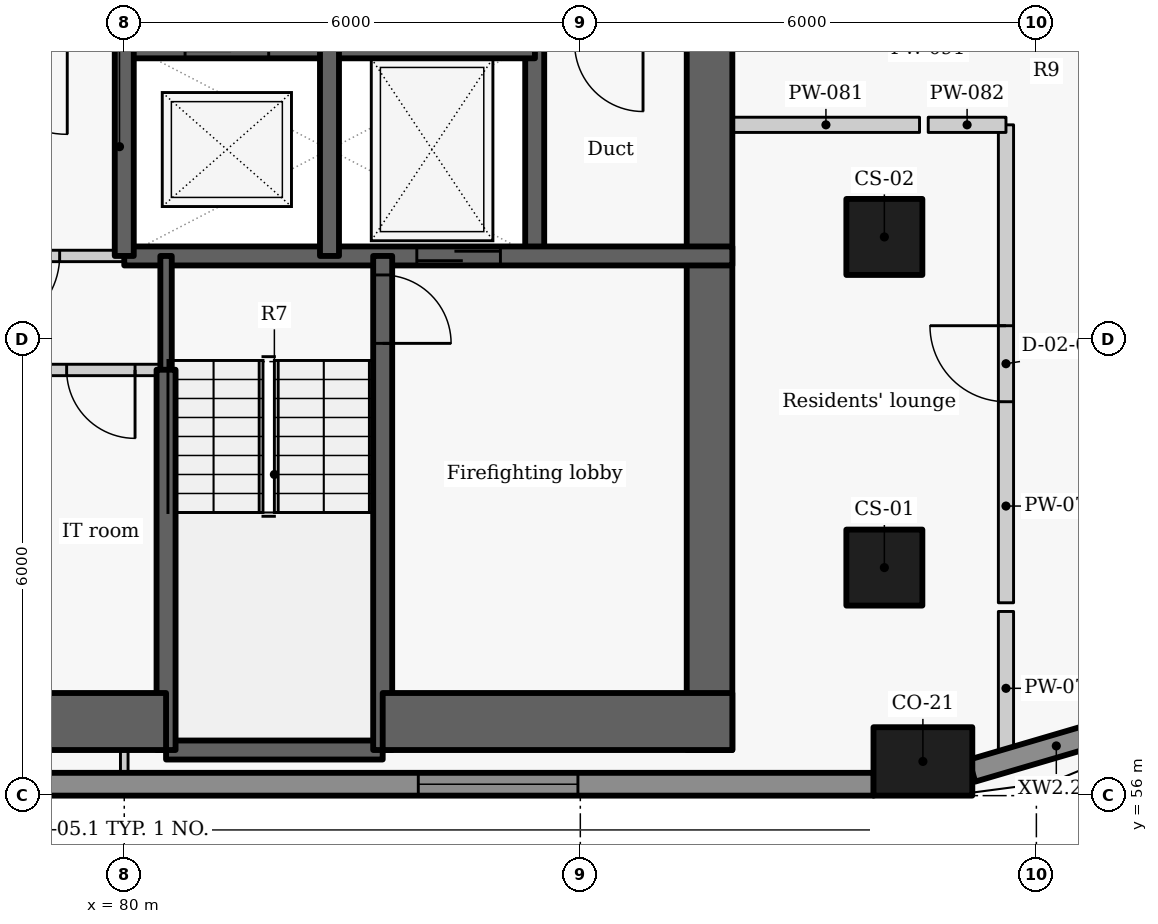
"""IFC4 building model, lengths in metres.
Left out: names, types, materials, properties, quantities, classifications, styles, units other than length and angle.
Written with IfcOpenShell. Run it as: python <this file> out.ifc"""

import sys

from ifc_helpers import new_model, si_unit, direction, frame, frame_2d, origin, origin_2d, place, context, subcontext, project, spatial, rectangle, extrude, element, fill, save


model = new_model("IFC4")
c1 = context("Model", 3, precision=1e-05, world=origin(), true_north=direction((0.0, 1.0)))
c2 = subcontext(c1, "Body", "Model", "MODEL_VIEW")
j1 = project(units=[si_unit("LENGTHUNIT", "METRE"), si_unit("PLANEANGLEUNIT", "RADIAN")], contexts=[c1])
p1 = place(None, origin())
s1 = spatial("IfcSite", under=j1, at=p1, CompositionType="ELEMENT")
p2 = place(p1, origin())
s2 = spatial("IfcBuilding", under=s1, at=p2, CompositionType="ELEMENT")
p3 = place(p2, frame((0.0, 0.0, 140.4)))
s3 = spatial("IfcBuildingStorey", under=s2, at=p3, CompositionType="ELEMENT", Elevation=140.4)
p4 = place(p3, frame((90.507, 56.45, 0.0), z_axis=(0.0, 0.0, 1.0), x_axis=(1.0, 0.0, 0.0)))
e1 = element("IfcColumn", 1, at=p4, inside=s3, PredefinedType="COLUMN", context=c2, shape_type="SweptSolid", body=[
    extrude(rectangle(XDim=1.3, YDim=0.9, at=origin_2d()), origin(), (0.0, 0.0, 1.0), 3.3),
])
for number, where, z_axis, x_axis in (
    (2, (90.0, 59.0, 0.0), (0.0, 0.0, 1.0), (0.0, 1.0, 0.0)),
    (3, (90.0, 63.35, 0.0), (0.0, 0.0, 1.0), (0.0, 1.0, 0.0)),
):
    element("IfcColumn", number, at=place(p3, frame(where, z_axis=z_axis, x_axis=x_axis)), inside=s3, PredefinedType="COLUMN", context=c2, shape_type="SweptSolid", body=[
        extrude(rectangle(XDim=1.0, YDim=1.0, at=origin_2d()), origin(), (0.0, 0.0, 1.0), 3.3),
    ])
p5 = place(p3, frame((69.821, 56.15, 0.0), z_axis=(0.0, 0.0, 1.0), x_axis=(1.0, 0.0, 0.0)))
e4 = element("IfcWall", 4, at=p5, inside=s3, PredefinedType="SOLIDWALL", context=c2, shape_type="SweptSolid", body=[
    extrude(rectangle(XDim=20.04, YDim=0.3, at=frame_2d((10.02, 0.0))), origin(), (0.0, 0.0, 1.0), 2.425),
])
p6 = place(p5, frame((4.051, 0.0, 0.9)))
e5 = element("IfcOpeningElement", 5, at=p6, cuts=e4, PredefinedType="OPENING", context=c2, shape_type="SweptSolid", body=[
    extrude(rectangle(XDim=2.1, YDim=1.1, at=frame_2d((1.05, 0.55))), frame((0.0, 0.16, 0.0), z_axis=(0.0, -1.0, 0.0), x_axis=(1.0, 0.0, 0.0)), (0.0, 0.0, 1.0), 0.32),
])
p7 = place(p5, frame((14.047, 0.0, 0.9)))
e6 = element("IfcOpeningElement", 6, at=p7, cuts=e4, PredefinedType="OPENING", context=c2, shape_type="SweptSolid", body=[
    extrude(rectangle(XDim=2.1, YDim=1.1, at=frame_2d((1.05, 0.55))), frame((0.0, 0.16, 0.0), z_axis=(0.0, -1.0, 0.0), x_axis=(1.0, 0.0, 0.0)), (0.0, 0.0, 1.0), 0.32),
])
p8 = place(p3, frame((91.153, 56.328, 0.0), z_axis=(0.0, 0.0, 1.0), x_axis=(0.959473072336, 0.281800325517, 0.0)))
e7 = element("IfcWall", 7, at=p8, inside=s3, PredefinedType="SOLIDWALL", context=c2, shape_type="SweptSolid", body=[
    extrude(rectangle(XDim=2.312, YDim=0.3, at=frame_2d((1.156, 0.0))), origin(), (0.0, 0.0, 1.0), 2.425),
])
p9 = place(p3, frame((85.4, 63.1, -0.275), z_axis=(0.0, 0.0, 1.0), x_axis=(0.0, 1.0, 0.0)))
e8 = element("IfcWall", 8, at=p9, inside=s3, PredefinedType="SHEAR", context=c2, shape_type="SweptSolid", body=[
    extrude(rectangle(XDim=2.8, YDim=0.25, at=frame_2d((1.4, 0.0))), origin(), (0.0, 0.0, 1.0), 3.3),
])
p10 = place(p3, frame((87.7, 72.2, -0.275), z_axis=(0.0, 0.0, 1.0), x_axis=(0.0, -1.0, 0.0)))
e9 = element("IfcWall", 9, at=p10, inside=s3, PredefinedType="SHEAR", context=c2, shape_type="SweptSolid", body=[
    extrude(rectangle(XDim=15.6, YDim=0.6, at=frame_2d((7.8, 0.0))), origin(), (0.0, 0.0, 1.0), 3.3),
])
p11 = place(p10, frame((3.852, 0.0, 0.275)))
e10 = element("IfcOpeningElement", 10, at=p11, cuts=e9, PredefinedType="OPENING", context=c2, shape_type="SweptSolid", body=[
    extrude(rectangle(XDim=1.5, YDim=2.1, at=frame_2d((0.75, 1.05))), frame((0.0, 0.31, 0.0), z_axis=(0.0, -1.0, 0.0), x_axis=(1.0, 0.0, 0.0)), (0.0, 0.0, 1.0), 0.62),
])
p12 = place(p3, frame((79.997, 65.9, -0.275), z_axis=(0.0, 0.0, 1.0), x_axis=(1.0, 0.0, 0.0)))
e11 = element("IfcWall", 11, at=p12, inside=s3, PredefinedType="SHEAR", context=c2, shape_type="SweptSolid", body=[
    extrude(rectangle(XDim=5.406, YDim=0.4, at=frame_2d((2.703, 0.0))), origin(), (0.0, 0.0, 1.0), 3.3),
])
p13 = place(p12, frame((0.803, 0.0, 0.275)))
e12 = element("IfcOpeningElement", 12, at=p13, cuts=e11, PredefinedType="OPENING", context=c2, shape_type="SweptSolid", body=[
    extrude(rectangle(XDim=1.1, YDim=2.1, at=frame_2d((0.55, 1.05))), frame((0.0, 0.21, 0.0), z_axis=(0.0, -1.0, 0.0), x_axis=(1.0, 0.0, 0.0)), (0.0, 0.0, 1.0), 0.42),
])
p14 = place(p3, frame((80.0, 63.1, -0.275), z_axis=(0.0, 0.0, 1.0), x_axis=(1.0, 0.0, 0.0)))
e13 = element("IfcWall", 13, at=p14, inside=s3, PredefinedType="SHEAR", context=c2, shape_type="SweptSolid", body=[
    extrude(rectangle(XDim=8.0, YDim=0.25, at=frame_2d((4.0, 0.0))), origin(), (0.0, 0.0, 1.0), 3.3),
])
p15 = place(p14, frame((3.849, 0.0, 0.275)))
e14 = element("IfcOpeningElement", 14, at=p15, cuts=e13, PredefinedType="OPENING", context=c2, shape_type="SweptSolid", body=[
    extrude(rectangle(XDim=1.1, YDim=2.1, at=frame_2d((0.55, 1.05))), frame((0.0, 0.135, 0.0), z_axis=(0.0, -1.0, 0.0), x_axis=(1.0, 0.0, 0.0)), (0.0, 0.0, 1.0), 0.27),
])
p16 = place(p3, frame((80.0, 63.1, -0.275), z_axis=(0.0, 0.0, 1.0), x_axis=(0.0, 1.0, 0.0)))
e15 = element("IfcWall", 15, at=p16, inside=s3, PredefinedType="SHEAR", context=c2, shape_type="SweptSolid", body=[
    extrude(rectangle(XDim=2.8, YDim=0.25, at=frame_2d((1.4, 0.0))), origin(), (0.0, 0.0, 1.0), 3.3),
])
p17 = place(p3, frame((80.0, 63.1, 0.0), z_axis=(0.0, 0.0, 1.0), x_axis=(-1.0, 0.0, 0.0)))
e16 = element("IfcWall", 16, at=p17, inside=s3, PredefinedType="PARTITIONING", context=c2, shape_type="SweptSolid", body=[
    extrude(rectangle(XDim=2.7, YDim=0.15, at=frame_2d((1.35, 0.0))), origin(), (0.0, 0.0, 1.0), 3.025),
])
p18 = place(p17, frame((0.85, 0.0, 0.0)))
e17 = element("IfcOpeningElement", 17, at=p18, cuts=e16, PredefinedType="OPENING", context=c2, shape_type="SweptSolid", body=[
    extrude(rectangle(XDim=1.0, YDim=2.1, at=frame_2d((0.5, 1.05))), frame((0.0, 0.085, 0.0), z_axis=(0.0, -1.0, 0.0), x_axis=(1.0, 0.0, 0.0)), (0.0, 0.0, 1.0), 0.17),
])
p19 = place(p3, frame((82.7, 63.1, -0.275), z_axis=(0.0, 0.0, 1.0), x_axis=(0.0, 1.0, 0.0)))
e18 = element("IfcWall", 18, at=p19, inside=s3, PredefinedType="SHEAR", context=c2, shape_type="SweptSolid", body=[
    extrude(rectangle(XDim=2.8, YDim=0.25, at=frame_2d((1.4, 0.0))), origin(), (0.0, 0.0, 1.0), 3.3),
])
p20 = place(p3, frame((80.55, 56.6, -0.275), z_axis=(0.0, 0.0, 1.0), x_axis=(1.0, 0.0, 0.0)))
e19 = element("IfcWall", 19, at=p20, inside=s3, PredefinedType="SHEAR", context=c2, shape_type="SweptSolid", body=[
    extrude(rectangle(XDim=2.85, YDim=0.25, at=frame_2d((1.425, 0.0))), origin(), (0.0, 0.0, 1.0), 3.3),
])
p21 = place(p3, frame((83.4, 63.1, -0.275), z_axis=(0.0, 0.0, 1.0), x_axis=(0.0, -1.0, 0.0)))
e20 = element("IfcWall", 20, at=p21, inside=s3, PredefinedType="SHEAR", context=c2, shape_type="SweptSolid", body=[
    extrude(rectangle(XDim=6.5, YDim=0.25, at=frame_2d((3.25, 0.0))), origin(), (0.0, 0.0, 1.0), 3.3),
])
p22 = place(p21, frame((0.25, 0.0, 0.275)))
e21 = element("IfcOpeningElement", 21, at=p22, cuts=e20, PredefinedType="OPENING", context=c2, shape_type="SweptSolid", body=[
    extrude(rectangle(XDim=0.9, YDim=2.1, at=frame_2d((0.45, 1.05))), frame((0.0, 0.135, 0.0), z_axis=(0.0, -1.0, 0.0), x_axis=(1.0, 0.0, 0.0)), (0.0, 0.0, 1.0), 0.27),
])
p23 = place(p3, frame((80.55, 61.597, -0.275), z_axis=(0.0, 0.0, 1.0), x_axis=(0.0, 1.0, 0.0)))
e22 = element("IfcWall", 22, at=p23, inside=s3, PredefinedType="SHEAR", context=c2, shape_type="SweptSolid", body=[
    extrude(rectangle(XDim=1.503, YDim=0.15, at=frame_2d((0.751, 0.0))), origin(), (0.0, 0.0, 1.0), 3.3),
])
p24 = place(p3, frame((80.55, 56.6, -0.275), z_axis=(0.0, 0.0, 1.0), x_axis=(0.0, 1.0, 0.0)))
e23 = element("IfcWall", 23, at=p24, inside=s3, PredefinedType="SHEAR", context=c2, shape_type="SweptSolid", body=[
    extrude(rectangle(XDim=5.003, YDim=0.25, at=frame_2d((2.501, 0.0))), origin(), (0.0, 0.0, 1.0), 3.3),
])
p25 = place(p3, frame((75.35, 56.975, -0.275), z_axis=(0.0, 0.0, 1.0), x_axis=(1.0, 0.0, 0.0)))
e24 = element("IfcWall", 24, at=p25, inside=s3, PredefinedType="SHEAR", context=c2, shape_type="SweptSolid", body=[
    extrude(rectangle(XDim=5.2, YDim=0.75, at=frame_2d((2.6, 0.0))), origin(), (0.0, 0.0, 1.0), 3.3),
])
p26 = place(p3, frame((83.4, 56.975, -0.275), z_axis=(0.0, 0.0, 1.0), x_axis=(1.0, 0.0, 0.0)))
e25 = element("IfcWall", 25, at=p26, inside=s3, PredefinedType="SHEAR", context=c2, shape_type="SweptSolid", body=[
    extrude(rectangle(XDim=4.6, YDim=0.75, at=frame_2d((2.3, 0.0))), origin(), (0.0, 0.0, 1.0), 3.3),
])
p27 = place(p3, frame((80.55, 61.6, 0.0), z_axis=(0.0, 0.0, 1.0), x_axis=(-1.0, 0.0, 0.0)))
e26 = element("IfcWall", 26, at=p27, inside=s3, PredefinedType="PARTITIONING", context=c2, shape_type="SweptSolid", body=[
    extrude(rectangle(XDim=5.2, YDim=0.15, at=frame_2d((2.6, 0.0))), origin(), (0.0, 0.0, 1.0), 3.025),
])
p28 = place(p27, frame((3.866, 0.0, 0.0)))
e27 = element("IfcOpeningElement", 27, at=p28, cuts=e26, PredefinedType="OPENING", context=c2, shape_type="SweptSolid", body=[
    extrude(rectangle(XDim=0.9, YDim=2.1, at=frame_2d((0.45, 1.05))), frame((0.0, 0.085, 0.0), z_axis=(0.0, -1.0, 0.0), x_axis=(1.0, 0.0, 0.0)), (0.0, 0.0, 1.0), 0.17),
])
p29 = place(p27, frame((2.124, 0.0, 0.0)))
e28 = element("IfcOpeningElement", 28, at=p29, cuts=e26, PredefinedType="OPENING", context=c2, shape_type="SweptSolid", body=[
    extrude(rectangle(XDim=0.9, YDim=2.1, at=frame_2d((0.45, 1.05))), frame((0.0, 0.085, 0.0), z_axis=(0.0, -1.0, 0.0), x_axis=(1.0, 0.0, 0.0)), (0.0, 0.0, 1.0), 0.17),
])
p30 = place(p27, frame((0.408, 0.0, 0.0)))
e29 = element("IfcOpeningElement", 29, at=p30, cuts=e26, PredefinedType="OPENING", context=c2, shape_type="SweptSolid", body=[
    extrude(rectangle(XDim=0.9, YDim=2.1, at=frame_2d((0.45, 1.05))), frame((0.0, 0.085, 0.0), z_axis=(0.0, -1.0, 0.0), x_axis=(1.0, 0.0, 0.0)), (0.0, 0.0, 1.0), 0.17),
])
p31 = place(p3, frame((91.6, 56.401, 0.0), z_axis=(0.0, 0.0, 1.0), x_axis=(0.0, 1.0, 0.0)))
e30 = element("IfcWall", 30, at=p31, inside=s3, PredefinedType="PARTITIONING", context=c2, shape_type="SweptSolid", body=[
    extrude(rectangle(XDim=2.022, YDim=0.2, at=frame_2d((1.011, 0.0))), origin(), (0.0, 0.0, 1.0), 2.405),
])
p32 = place(p3, frame((91.6, 58.537, 0.0), z_axis=(0.0, 0.0, 1.0), x_axis=(0.0, 1.0, 0.0)))
e31 = element("IfcWall", 31, at=p32, inside=s3, PredefinedType="PARTITIONING", context=c2, shape_type="SweptSolid", body=[
    extrude(rectangle(XDim=6.288, YDim=0.2, at=frame_2d((3.144, 0.0))), origin(), (0.0, 0.0, 1.0), 3.025),
])
p33 = place(p32, frame((2.645, 0.0, 0.0)))
e32 = element("IfcOpeningElement", 32, at=p33, cuts=e31, PredefinedType="OPENING", context=c2, shape_type="SweptSolid", body=[
    extrude(rectangle(XDim=1.0, YDim=2.1, at=frame_2d((0.5, 1.05))), frame((0.0, 0.11, 0.0), z_axis=(0.0, -1.0, 0.0), x_axis=(1.0, 0.0, 0.0)), (0.0, 0.0, 1.0), 0.22),
])
p34 = place(p3, frame((88.0, 64.825, 0.0), z_axis=(0.0, 0.0, 1.0), x_axis=(1.0, 0.0, 0.0)))
e33 = element("IfcWall", 33, at=p34, inside=s3, PredefinedType="PARTITIONING", context=c2, shape_type="SweptSolid", body=[
    extrude(rectangle(XDim=2.463, YDim=0.2, at=frame_2d((1.231, 0.0))), origin(), (0.0, 0.0, 1.0), 2.505),
])
p35 = place(p3, frame((90.577, 64.825, 0.0), z_axis=(0.0, 0.0, 1.0), x_axis=(1.0, 0.0, 0.0)))
e34 = element("IfcWall", 34, at=p35, inside=s3, PredefinedType="PARTITIONING", context=c2, shape_type="SweptSolid", body=[
    extrude(rectangle(XDim=1.023, YDim=0.2, at=frame_2d((0.511, 0.0))), origin(), (0.0, 0.0, 1.0), 3.025),
])
p36 = place(p3, frame((80.0, 56.3, 0.0), z_axis=(0.0, 0.0, 1.0), x_axis=(0.0, 1.0, 0.0)))
e35 = element("IfcWall", 35, at=p36, inside=s3, PredefinedType="PARTITIONING", context=c2, shape_type="SweptSolid", body=[
    extrude(rectangle(XDim=0.3, YDim=0.1, at=frame_2d((0.15, 0.0))), origin(), (0.0, 0.0, 1.0), 3.025),
])
p37 = place(p7, origin())
e36 = element("IfcWindow", 36, at=p37, inside=s3, PartitioningType="SINGLE_PANEL", PredefinedType="WINDOW", context=c2, shape_type="SweptSolid", body=[
    extrude(rectangle(XDim=2.1, YDim=1.1, at=frame_2d((1.05, 0.55))), frame((0.0, 0.03, 0.0), z_axis=(0.0, -1.0, 0.0), x_axis=(1.0, 0.0, 0.0)), (0.0, 0.0, 1.0), 0.06),
])
fill(e6, e36)
p38 = place(p15, origin())
e37 = element("IfcDoor", 37, at=p38, inside=s3, OperationType="SLIDING_TO_LEFT", PredefinedType="DOOR", context=c2, shape_type="SweptSolid", body=[
    extrude(rectangle(XDim=1.1, YDim=2.1, at=frame_2d((0.55, 1.05))), frame((0.0, 0.025, 0.0), z_axis=(0.0, -1.0, 0.0), x_axis=(1.0, 0.0, 0.0)), (0.0, 0.0, 1.0), 0.05),
])
fill(e14, e37)
p39 = place(p18, origin())
e38 = element("IfcDoor", 38, at=p39, inside=s3, OperationType="SINGLE_SWING_RIGHT", PredefinedType="DOOR", context=c2, shape_type="SweptSolid", body=[
    extrude(rectangle(XDim=1.0, YDim=2.1, at=frame_2d((0.5, 1.05))), frame((0.0, 0.025, 0.0), z_axis=(0.0, -1.0, 0.0), x_axis=(1.0, 0.0, 0.0)), (0.0, 0.0, 1.0), 0.05),
])
fill(e17, e38)
p40 = place(p30, origin())
e39 = element("IfcDoor", 39, at=p40, inside=s3, OperationType="SINGLE_SWING_LEFT", PredefinedType="DOOR", context=c2, shape_type="SweptSolid", body=[
    extrude(rectangle(XDim=0.9, YDim=2.1, at=frame_2d((0.45, 1.05))), frame((0.0, 0.025, 0.0), z_axis=(0.0, -1.0, 0.0), x_axis=(1.0, 0.0, 0.0)), (0.0, 0.0, 1.0), 0.05),
])
fill(e29, e39)
p41 = place(p22, origin())
e40 = element("IfcDoor", 40, at=p41, inside=s3, OperationType="SINGLE_SWING_RIGHT", PredefinedType="DOOR", context=c2, shape_type="SweptSolid", body=[
    extrude(rectangle(XDim=0.9, YDim=2.1, at=frame_2d((0.45, 1.05))), frame((0.0, 0.025, 0.0), z_axis=(0.0, -1.0, 0.0), x_axis=(1.0, 0.0, 0.0)), (0.0, 0.0, 1.0), 0.05),
])
fill(e21, e40)
p42 = place(p33, origin())
e41 = element("IfcDoor", 41, at=p42, inside=s3, OperationType="SINGLE_SWING_RIGHT", PredefinedType="DOOR", context=c2, shape_type="SweptSolid", body=[
    extrude(rectangle(XDim=1.0, YDim=2.1, at=frame_2d((0.5, 1.05))), frame((0.0, 0.025, 0.0), z_axis=(0.0, -1.0, 0.0), x_axis=(1.0, 0.0, 0.0)), (0.0, 0.0, 1.0), 0.05),
])
fill(e32, e41)
save(model, sys.argv[1])
